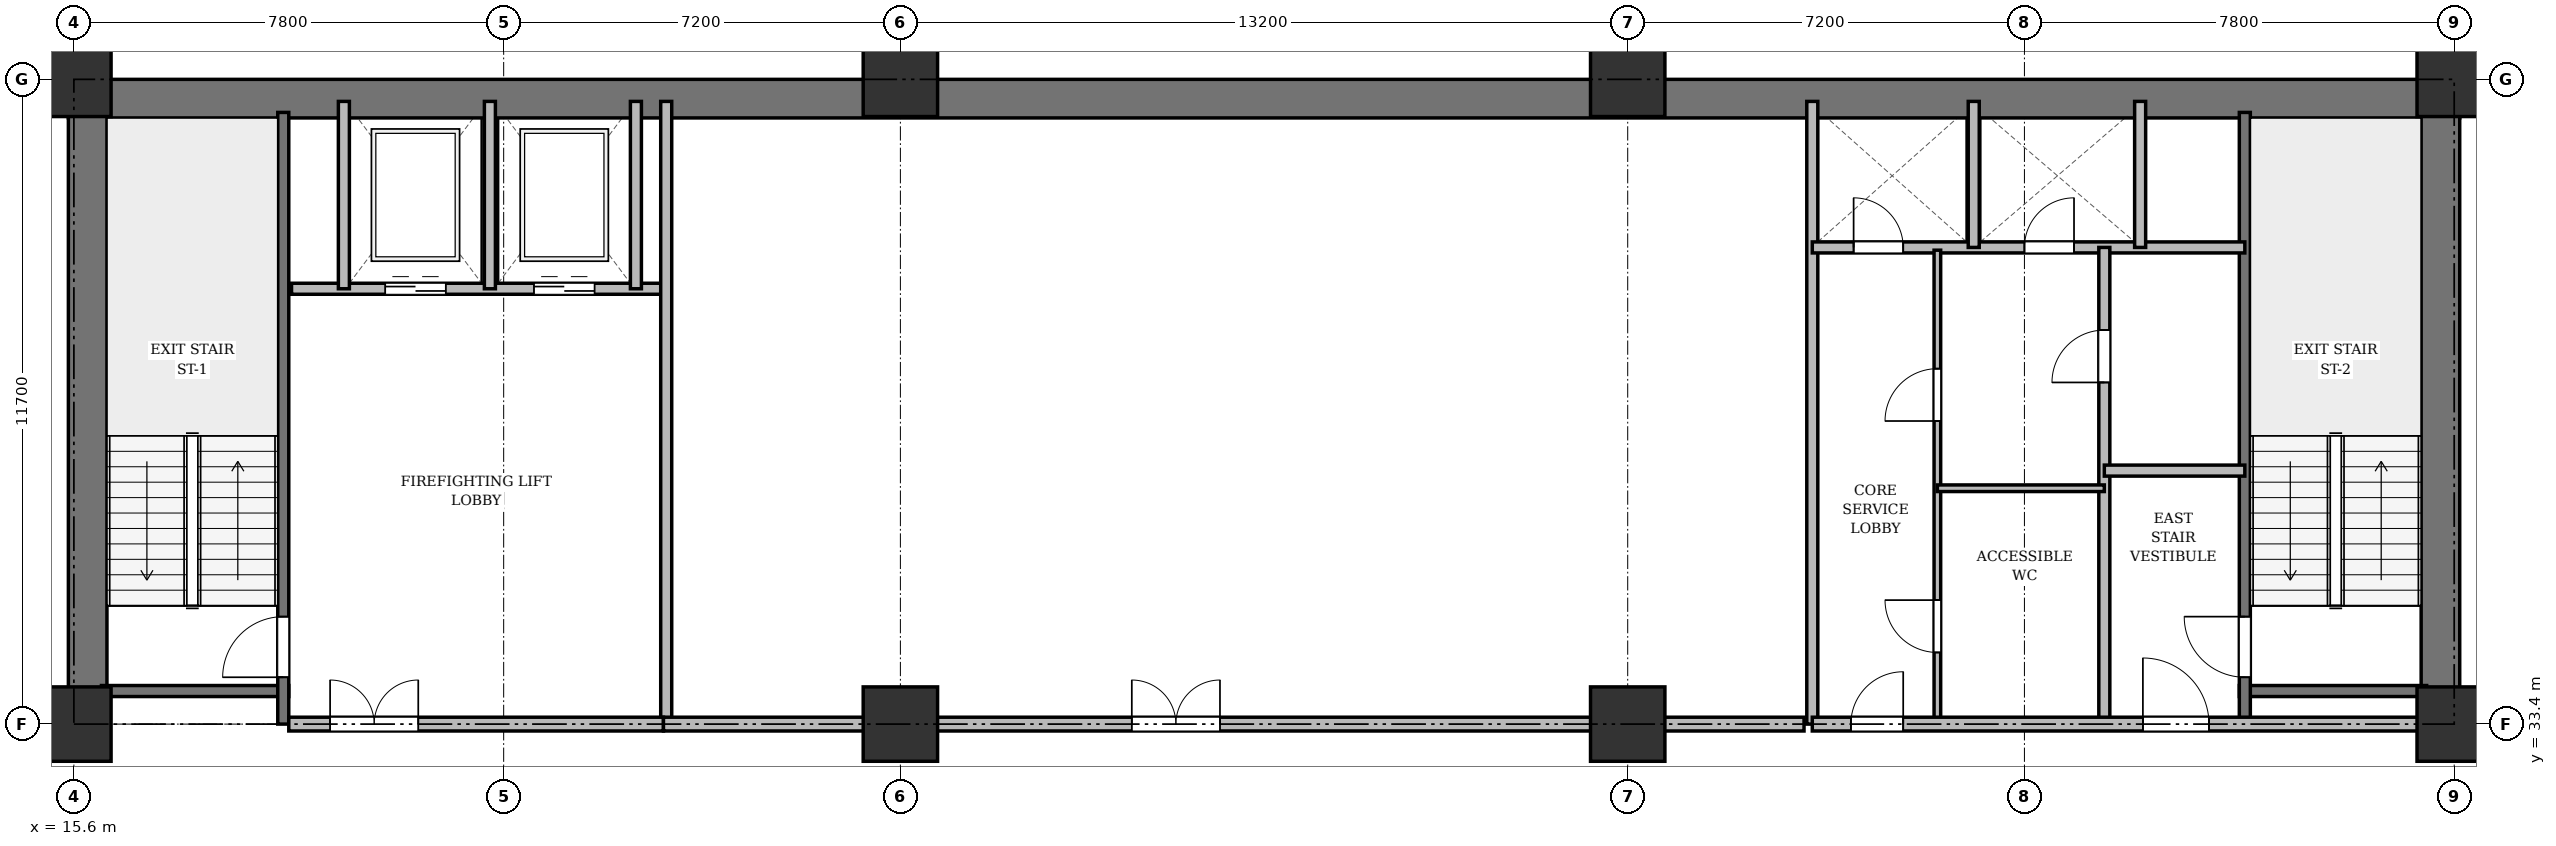
"""IFC4 building model, lengths in metres.
Left out: names, types, materials, properties, quantities, classifications, styles, units other than length and angle.
Written with IfcOpenShell. Run it as: python <this file> out.ifc"""

import sys

from ifc_helpers import new_model, si_unit, direction, frame, frame_2d, origin, origin_2d, place, context, subcontext, project, spatial, rectangle, extrude, source, transform, mapped, element, fill, save


model = new_model("IFC4")
c1 = context("Model", 3, precision=1e-05, world=origin(), true_north=direction((0.0, 1.0)))
c2 = subcontext(c1, "Body", "Model", "MODEL_VIEW")
j1 = project(units=[si_unit("LENGTHUNIT", "METRE"), si_unit("PLANEANGLEUNIT", "RADIAN")], contexts=[c1])
p1 = place(None, origin())
s1 = spatial("IfcSite", under=j1, at=p1, CompositionType="ELEMENT")
p2 = place(p1, origin())
s2 = spatial("IfcBuilding", under=s1, at=p2, CompositionType="ELEMENT")
p3 = place(p2, frame((0.0, 0.0, -8.6)))
s3 = spatial("IfcBuildingStorey", under=s2, at=p3, CompositionType="ELEMENT", Elevation=-8.6)
m1 = source(origin(), c2, "Body", "SweptSolid", [
    extrude(rectangle(XDim=1.35, YDim=1.35, at=origin_2d()), origin(), (0.0, 0.0, 1.0), 4.3),
])
for number, where, z_axis, x_axis in (
    (1, (15.6, 33.4, 0.0), (0.0, 0.0, 1.0), (1.0, 0.0, 0.0)),
    (2, (15.6, 45.1, 0.0), (0.0, 0.0, 1.0), (1.0, 0.0, 0.0)),
    (3, (30.6, 33.4, 0.0), (0.0, 0.0, 1.0), (1.0, 0.0, 0.0)),
    (4, (30.6, 45.1, 0.0), (0.0, 0.0, 1.0), (1.0, 0.0, 0.0)),
    (5, (43.8, 33.4, 0.0), (0.0, 0.0, 1.0), (1.0, 0.0, 0.0)),
    (6, (43.8, 45.1, 0.0), (0.0, 0.0, 1.0), (1.0, 0.0, 0.0)),
    (7, (58.8, 33.4, 0.0), (0.0, 0.0, 1.0), (1.0, 0.0, 0.0)),
    (8, (58.8, 45.1, 0.0), (0.0, 0.0, 1.0), (1.0, 0.0, 0.0)),
):
    element("IfcColumn", number, at=place(p3, frame(where, z_axis=z_axis, x_axis=x_axis)), inside=s3, PredefinedType="COLUMN", context=c2, shape_type="MappedRepresentation", body=[
        mapped(m1, transform((0.0, 0.0, 0.0), x_axis=(1.0, 0.0, 0.0), y_axis=(0.0, 1.0, 0.0), z_axis=(0.0, 0.0, 1.0), scale=1.0)),
    ])
p4 = place(p3, frame((15.5, 44.75, 0.0), z_axis=(0.0, 0.0, 1.0), x_axis=(1.0, 0.0, 0.0)))
e9 = element("IfcWall", 9, at=p4, inside=s3, PredefinedType="SHEAR", context=c2, shape_type="SweptSolid", body=[
    extrude(rectangle(XDim=43.4, YDim=0.7, at=frame_2d((21.7, 0.0))), origin(), (0.0, 0.0, 1.0), 3.98),
])
for number, where, z_axis, x_axis in (
    (10, (15.85, 33.4, 0.0), (0.0, 0.0, 1.0), (0.0, 1.0, 0.0)),
    (11, (58.55, 33.4, 0.0), (0.0, 0.0, 1.0), (0.0, 1.0, 0.0)),
):
    element("IfcWall", number, at=place(p3, frame(where, z_axis=z_axis, x_axis=x_axis)), inside=s3, PredefinedType="SHEAR", context=c2, shape_type="SweptSolid", body=[
        extrude(rectangle(XDim=11.7, YDim=0.7, at=frame_2d((5.85, 0.0))), origin(), (0.0, 0.0, 1.0), 3.98),
    ])
p5 = place(p3, frame((16.1, 34.0, 0.0), z_axis=(0.0, 0.0, 1.0), x_axis=(1.0, 0.0, 0.0)))
e12 = element("IfcWall", 12, at=p5, inside=s3, PredefinedType="SHEAR", context=c2, shape_type="SweptSolid", body=[
    extrude(rectangle(XDim=3.4, YDim=0.2, at=frame_2d((1.7, 0.0))), origin(), (0.0, 0.0, 1.0), 3.98),
])
p6 = place(p3, frame((19.4, 33.4, 0.0), z_axis=(0.0, 0.0, 1.0), x_axis=(0.0, 1.0, 0.0)))
e13 = element("IfcWall", 13, at=p6, inside=s3, PredefinedType="SHEAR", context=c2, shape_type="SweptSolid", body=[
    extrude(rectangle(XDim=11.1, YDim=0.2, at=frame_2d((5.55, 0.0))), origin(), (0.0, 0.0, 1.0), 3.98),
])
p7 = place(p6, frame((0.85, 0.0, 0.0)))
e14 = element("IfcOpeningElement", 14, at=p7, cuts=e13, PredefinedType="OPENING", context=c2, shape_type="SweptSolid", body=[
    extrude(rectangle(XDim=1.1, YDim=2.15, at=frame_2d((0.55, 1.075))), frame((0.0, 0.11, 0.0), z_axis=(0.0, -1.0, 0.0), x_axis=(1.0, 0.0, 0.0)), (0.0, 0.0, 1.0), 0.22),
])
p8 = place(p3, frame((54.9, 34.0, 0.0), z_axis=(0.0, 0.0, 1.0), x_axis=(1.0, 0.0, 0.0)))
e15 = element("IfcWall", 15, at=p8, inside=s3, PredefinedType="SHEAR", context=c2, shape_type="SweptSolid", body=[
    extrude(rectangle(XDim=3.4, YDim=0.2, at=frame_2d((1.7, 0.0))), origin(), (0.0, 0.0, 1.0), 3.98),
])
p9 = place(p3, frame((55.0, 33.4, 0.0), z_axis=(0.0, 0.0, 1.0), x_axis=(0.0, 1.0, 0.0)))
e16 = element("IfcWall", 16, at=p9, inside=s3, PredefinedType="SHEAR", context=c2, shape_type="SweptSolid", body=[
    extrude(rectangle(XDim=11.1, YDim=0.2, at=frame_2d((5.55, 0.0))), origin(), (0.0, 0.0, 1.0), 3.98),
])
p10 = place(p9, frame((0.85, 0.0, 0.0)))
e17 = element("IfcOpeningElement", 17, at=p10, cuts=e16, PredefinedType="OPENING", context=c2, shape_type="SweptSolid", body=[
    extrude(rectangle(XDim=1.1, YDim=2.15, at=frame_2d((0.55, 1.075))), frame((0.0, 0.11, 0.0), z_axis=(0.0, -1.0, 0.0), x_axis=(1.0, 0.0, 0.0)), (0.0, 0.0, 1.0), 0.22),
])
p11 = place(p3, frame((19.55, 41.3, 0.0), z_axis=(0.0, 0.0, 1.0), x_axis=(1.0, 0.0, 0.0)))
e18 = element("IfcWall", 18, at=p11, inside=s3, PredefinedType="SOLIDWALL", context=c2, shape_type="SweptSolid", body=[
    extrude(rectangle(XDim=6.75, YDim=0.2, at=frame_2d((3.375, 0.0))), origin(), (0.0, 0.0, 1.0), 3.98),
])
p12 = place(p11, frame((1.7, 0.0, 0.0)))
e19 = element("IfcOpeningElement", 19, at=p12, cuts=e18, PredefinedType="OPENING", context=c2, shape_type="SweptSolid", body=[
    extrude(rectangle(XDim=1.1, YDim=2.15, at=frame_2d((0.55, 1.075))), frame((0.0, 0.11, 0.0), z_axis=(0.0, -1.0, 0.0), x_axis=(1.0, 0.0, 0.0)), (0.0, 0.0, 1.0), 0.22),
])
p13 = place(p11, frame((4.4, 0.0, 0.0)))
e20 = element("IfcOpeningElement", 20, at=p13, cuts=e18, PredefinedType="OPENING", context=c2, shape_type="SweptSolid", body=[
    extrude(rectangle(XDim=1.1, YDim=2.15, at=frame_2d((0.55, 1.075))), frame((0.0, 0.11, 0.0), z_axis=(0.0, -1.0, 0.0), x_axis=(1.0, 0.0, 0.0)), (0.0, 0.0, 1.0), 0.22),
])
for number, where, z_axis, x_axis in (
    (21, (20.5, 41.3, 0.0), (0.0, 0.0, 1.0), (0.0, 1.0, 0.0)),
    (22, (23.15, 41.3, 0.0), (0.0, 0.0, 1.0), (0.0, 1.0, 0.0)),
    (23, (25.8, 41.3, 0.0), (0.0, 0.0, 1.0), (0.0, 1.0, 0.0)),
):
    element("IfcWall", number, at=place(p3, frame(where, z_axis=z_axis, x_axis=x_axis)), inside=s3, PredefinedType="SOLIDWALL", context=c2, shape_type="SweptSolid", body=[
        extrude(rectangle(XDim=3.4, YDim=0.2, at=frame_2d((1.7, 0.0))), origin(), (0.0, 0.0, 1.0), 3.98),
    ])
p14 = place(p3, frame((26.35, 33.4, 0.0), z_axis=(0.0, 0.0, 1.0), x_axis=(0.0, 1.0, 0.0)))
e24 = element("IfcWall", 24, at=p14, inside=s3, PredefinedType="SOLIDWALL", context=c2, shape_type="SweptSolid", body=[
    extrude(rectangle(XDim=11.3, YDim=0.2, at=frame_2d((5.65, 0.0))), origin(), (0.0, 0.0, 1.0), 3.28),
])
p15 = place(p3, frame((19.5, 33.4, 0.0), z_axis=(0.0, 0.0, 1.0), x_axis=(1.0, 0.0, 0.0)))
e25 = element("IfcWall", 25, at=p15, inside=s3, PredefinedType="PARTITIONING", context=c2, shape_type="SweptSolid", body=[
    extrude(rectangle(XDim=6.8, YDim=0.25, at=frame_2d((3.4, 0.0))), origin(), (0.0, 0.0, 1.0), 3.28),
])
p16 = place(p15, frame((0.75, 0.0, 0.0)))
e26 = element("IfcOpeningElement", 26, at=p16, cuts=e25, PredefinedType="OPENING", context=c2, shape_type="SweptSolid", body=[
    extrude(rectangle(XDim=1.6, YDim=2.2, at=frame_2d((0.8, 1.1))), frame((0.0, 0.135, 0.0), z_axis=(0.0, -1.0, 0.0), x_axis=(1.0, 0.0, 0.0)), (0.0, 0.0, 1.0), 0.27),
])
p17 = place(p3, frame((47.15, 33.4, 0.0), z_axis=(0.0, 0.0, 1.0), x_axis=(0.0, 1.0, 0.0)))
e27 = element("IfcWall", 27, at=p17, inside=s3, PredefinedType="SOLIDWALL", context=c2, shape_type="SweptSolid", body=[
    extrude(rectangle(XDim=11.3, YDim=0.2, at=frame_2d((5.65, 0.0))), origin(), (0.0, 0.0, 1.0), 3.28),
])
p18 = place(p3, frame((26.3, 33.4, 0.0), z_axis=(0.0, 0.0, 1.0), x_axis=(1.0, 0.0, 0.0)))
e28 = element("IfcWall", 28, at=p18, inside=s3, PredefinedType="PARTITIONING", context=c2, shape_type="SweptSolid", body=[
    extrude(rectangle(XDim=20.7, YDim=0.25, at=frame_2d((10.35, 0.0))), origin(), (0.0, 0.0, 1.0), 3.28),
])
p19 = place(p18, frame((8.5, 0.0, 0.0)))
e29 = element("IfcOpeningElement", 29, at=p19, cuts=e28, PredefinedType="OPENING", context=c2, shape_type="SweptSolid", body=[
    extrude(rectangle(XDim=1.6, YDim=2.2, at=frame_2d((0.8, 1.1))), frame((0.0, 0.135, 0.0), z_axis=(0.0, -1.0, 0.0), x_axis=(1.0, 0.0, 0.0)), (0.0, 0.0, 1.0), 0.27),
])
p20 = place(p3, frame((47.15, 42.05, 0.0), z_axis=(0.0, 0.0, 1.0), x_axis=(1.0, 0.0, 0.0)))
e30 = element("IfcWall", 30, at=p20, inside=s3, PredefinedType="SOLIDWALL", context=c2, shape_type="SweptSolid", body=[
    extrude(rectangle(XDim=7.85, YDim=0.2, at=frame_2d((3.925, 0.0))), origin(), (0.0, 0.0, 1.0), 3.98),
])
p21 = place(p20, frame((0.75, 0.0, 0.0)))
e31 = element("IfcOpeningElement", 31, at=p21, cuts=e30, PredefinedType="OPENING", context=c2, shape_type="SweptSolid", body=[
    extrude(rectangle(XDim=0.9, YDim=2.1, at=frame_2d((0.45, 1.05))), frame((0.0, 0.11, 0.0), z_axis=(0.0, -1.0, 0.0), x_axis=(1.0, 0.0, 0.0)), (0.0, 0.0, 1.0), 0.22),
])
p22 = place(p20, frame((3.85, 0.0, 0.0)))
e32 = element("IfcOpeningElement", 32, at=p22, cuts=e30, PredefinedType="OPENING", context=c2, shape_type="SweptSolid", body=[
    extrude(rectangle(XDim=0.9, YDim=2.1, at=frame_2d((0.45, 1.05))), frame((0.0, 0.11, 0.0), z_axis=(0.0, -1.0, 0.0), x_axis=(1.0, 0.0, 0.0)), (0.0, 0.0, 1.0), 0.22),
])
for number, where, z_axis, x_axis in (
    (33, (50.08, 42.05, 0.0), (0.0, 0.0, 1.0), (0.0, 1.0, 0.0)),
    (34, (53.1, 42.05, 0.0), (0.0, 0.0, 1.0), (0.0, 1.0, 0.0)),
):
    element("IfcWall", number, at=place(p3, frame(where, z_axis=z_axis, x_axis=x_axis)), inside=s3, PredefinedType="SOLIDWALL", context=c2, shape_type="SweptSolid", body=[
        extrude(rectangle(XDim=2.65, YDim=0.2, at=frame_2d((1.325, 0.0))), origin(), (0.0, 0.0, 1.0), 3.98),
    ])
p23 = place(p3, frame((52.45, 33.4, 0.0), z_axis=(0.0, 0.0, 1.0), x_axis=(0.0, 1.0, 0.0)))
e35 = element("IfcWall", 35, at=p23, inside=s3, PredefinedType="PARTITIONING", context=c2, shape_type="SweptSolid", body=[
    extrude(rectangle(XDim=8.65, YDim=0.2, at=frame_2d((4.325, 0.0))), origin(), (0.0, 0.0, 1.0), 3.28),
])
p24 = place(p23, frame((6.2, 0.0, 0.0)))
e36 = element("IfcOpeningElement", 36, at=p24, cuts=e35, PredefinedType="OPENING", context=c2, shape_type="SweptSolid", body=[
    extrude(rectangle(XDim=0.95, YDim=2.15, at=frame_2d((0.475, 1.075))), frame((0.0, 0.11, 0.0), z_axis=(0.0, -1.0, 0.0), x_axis=(1.0, 0.0, 0.0)), (0.0, 0.0, 1.0), 0.22),
])
p25 = place(p3, frame((52.45, 38.0, 0.0), z_axis=(0.0, 0.0, 1.0), x_axis=(1.0, 0.0, 0.0)))
e37 = element("IfcWall", 37, at=p25, inside=s3, PredefinedType="PARTITIONING", context=c2, shape_type="SweptSolid", body=[
    extrude(rectangle(XDim=2.55, YDim=0.2, at=frame_2d((1.275, 0.0))), origin(), (0.0, 0.0, 1.0), 3.98),
])
p26 = place(p3, frame((49.42, 33.4, 0.0), z_axis=(0.0, 0.0, 1.0), x_axis=(0.0, 1.0, 0.0)))
e38 = element("IfcWall", 38, at=p26, inside=s3, PredefinedType="PARTITIONING", context=c2, shape_type="SweptSolid", body=[
    extrude(rectangle(XDim=8.6, YDim=0.12, at=frame_2d((4.3, 0.0))), origin(), (0.0, 0.0, 1.0), 3.28),
])
p27 = place(p26, frame((1.3, 0.0, 0.0)))
e39 = element("IfcOpeningElement", 39, at=p27, cuts=e38, PredefinedType="OPENING", context=c2, shape_type="SweptSolid", body=[
    extrude(rectangle(XDim=0.95, YDim=2.15, at=frame_2d((0.475, 1.075))), frame((0.0, 0.07, 0.0), z_axis=(0.0, -1.0, 0.0), x_axis=(1.0, 0.0, 0.0)), (0.0, 0.0, 1.0), 0.14),
])
p28 = place(p26, frame((5.5, 0.0, 0.0)))
e40 = element("IfcOpeningElement", 40, at=p28, cuts=e38, PredefinedType="OPENING", context=c2, shape_type="SweptSolid", body=[
    extrude(rectangle(XDim=0.95, YDim=2.15, at=frame_2d((0.475, 1.075))), frame((0.0, 0.07, 0.0), z_axis=(0.0, -1.0, 0.0), x_axis=(1.0, 0.0, 0.0)), (0.0, 0.0, 1.0), 0.14),
])
p29 = place(p3, frame((49.42, 37.68, 0.0), z_axis=(0.0, 0.0, 1.0), x_axis=(1.0, 0.0, 0.0)))
e41 = element("IfcWall", 41, at=p29, inside=s3, PredefinedType="PARTITIONING", context=c2, shape_type="SweptSolid", body=[
    extrude(rectangle(XDim=3.03, YDim=0.12, at=frame_2d((1.515, 0.0))), origin(), (0.0, 0.0, 1.0), 3.98),
])
p30 = place(p3, frame((47.15, 33.4, 0.0), z_axis=(0.0, 0.0, 1.0), x_axis=(1.0, 0.0, 0.0)))
e42 = element("IfcWall", 42, at=p30, inside=s3, PredefinedType="PARTITIONING", context=c2, shape_type="SweptSolid", body=[
    extrude(rectangle(XDim=11.15, YDim=0.25, at=frame_2d((5.575, 0.0))), origin(), (0.0, 0.0, 1.0), 3.28),
])
p31 = place(p30, frame((0.7, 0.0, 0.0)))
e43 = element("IfcOpeningElement", 43, at=p31, cuts=e42, PredefinedType="OPENING", context=c2, shape_type="SweptSolid", body=[
    extrude(rectangle(XDim=0.95, YDim=2.15, at=frame_2d((0.475, 1.075))), frame((0.0, 0.135, 0.0), z_axis=(0.0, -1.0, 0.0), x_axis=(1.0, 0.0, 0.0)), (0.0, 0.0, 1.0), 0.27),
])
p32 = place(p30, frame((6.0, 0.0, 0.0)))
e44 = element("IfcOpeningElement", 44, at=p32, cuts=e42, PredefinedType="OPENING", context=c2, shape_type="SweptSolid", body=[
    extrude(rectangle(XDim=1.2, YDim=2.15, at=frame_2d((0.6, 1.075))), frame((0.0, 0.135, 0.0), z_axis=(0.0, -1.0, 0.0), x_axis=(1.0, 0.0, 0.0)), (0.0, 0.0, 1.0), 0.27),
])
p33 = place(p3, frame((58.5, 33.4, 0.0), z_axis=(0.0, 0.0, 1.0), x_axis=(1.0, 0.0, 0.0)))
e45 = element("IfcWall", 45, at=p33, inside=s3, PredefinedType="PARTITIONING", context=c2, shape_type="SweptSolid", body=[
    extrude(rectangle(XDim=15.1, YDim=0.2, at=frame_2d((7.55, 0.0))), origin(), (0.0, 0.0, 1.0), 3.28),
])
p34 = place(p33, frame((7.2, 0.0, 0.0)))
e46 = element("IfcOpeningElement", 46, at=p34, cuts=e45, PredefinedType="OPENING", context=c2, shape_type="SweptSolid", body=[
    extrude(rectangle(XDim=1.2, YDim=2.15, at=frame_2d((0.6, 1.075))), frame((0.0, 0.11, 0.0), z_axis=(0.0, -1.0, 0.0), x_axis=(1.0, 0.0, 0.0)), (0.0, 0.0, 1.0), 0.22),
])
m2 = source(origin(), c2, "Body", "SweptSolid", [
    extrude(rectangle(XDim=1.1, YDim=2.15, at=frame_2d((0.55, 1.075))), frame((0.0, 0.025, 0.0), z_axis=(0.0, -1.0, 0.0), x_axis=(1.0, 0.0, 0.0)), (0.0, 0.0, 1.0), 0.05),
])
p35 = place(p7, origin())
e47 = element("IfcDoor", 47, at=p35, inside=s3, OperationType="SINGLE_SWING_LEFT", PredefinedType="DOOR", context=c2, shape_type="MappedRepresentation", body=[
    mapped(m2, transform((0.0, 0.0, 0.0), x_axis=(1.0, 0.0, 0.0), y_axis=(0.0, 1.0, 0.0), z_axis=(0.0, 0.0, 1.0), scale=1.0)),
])
fill(e14, e47)
p36 = place(p10, origin())
e48 = element("IfcDoor", 48, at=p36, inside=s3, OperationType="SINGLE_SWING_RIGHT", PredefinedType="DOOR", context=c2, shape_type="MappedRepresentation", body=[
    mapped(m2, transform((0.0, 0.0, 0.0), x_axis=(1.0, 0.0, 0.0), y_axis=(0.0, 1.0, 0.0), z_axis=(0.0, 0.0, 1.0), scale=1.0)),
])
fill(e17, e48)
p37 = place(p12, origin())
e49 = element("IfcDoor", 49, at=p37, inside=s3, OperationType="DOUBLE_DOOR_SLIDING", PredefinedType="DOOR", context=c2, shape_type="MappedRepresentation", body=[
    mapped(m2, transform((0.0, 0.0, 0.0), x_axis=(1.0, 0.0, 0.0), y_axis=(0.0, 1.0, 0.0), z_axis=(0.0, 0.0, 1.0), scale=1.0)),
])
fill(e19, e49)
p38 = place(p13, origin())
e50 = element("IfcDoor", 50, at=p38, inside=s3, OperationType="DOUBLE_DOOR_SLIDING", PredefinedType="DOOR", context=c2, shape_type="MappedRepresentation", body=[
    mapped(m2, transform((0.0, 0.0, 0.0), x_axis=(1.0, 0.0, 0.0), y_axis=(0.0, 1.0, 0.0), z_axis=(0.0, 0.0, 1.0), scale=1.0)),
])
fill(e20, e50)
m3 = source(origin(), c2, "Body", "SweptSolid", [
    extrude(rectangle(XDim=1.6, YDim=2.2, at=frame_2d((0.8, 1.1))), frame((0.0, 0.025, 0.0), z_axis=(0.0, -1.0, 0.0), x_axis=(1.0, 0.0, 0.0)), (0.0, 0.0, 1.0), 0.05),
])
p39 = place(p16, origin())
e51 = element("IfcDoor", 51, at=p39, inside=s3, OperationType="DOUBLE_DOOR_SINGLE_SWING", PredefinedType="DOOR", context=c2, shape_type="MappedRepresentation", body=[
    mapped(m3, transform((0.0, 0.0, 0.0), x_axis=(1.0, 0.0, 0.0), y_axis=(0.0, 1.0, 0.0), z_axis=(0.0, 0.0, 1.0), scale=1.0)),
])
fill(e26, e51)
p40 = place(p19, origin())
e52 = element("IfcDoor", 52, at=p40, inside=s3, OperationType="DOUBLE_DOOR_SINGLE_SWING", PredefinedType="DOOR", context=c2, shape_type="MappedRepresentation", body=[
    mapped(m3, transform((0.0, 0.0, 0.0), x_axis=(1.0, 0.0, 0.0), y_axis=(0.0, 1.0, 0.0), z_axis=(0.0, 0.0, 1.0), scale=1.0)),
])
fill(e29, e52)
m4 = source(origin(), c2, "Body", "SweptSolid", [
    extrude(rectangle(XDim=0.9, YDim=2.1, at=frame_2d((0.45, 1.05))), frame((0.0, 0.025, 0.0), z_axis=(0.0, -1.0, 0.0), x_axis=(1.0, 0.0, 0.0)), (0.0, 0.0, 1.0), 0.05),
])
p41 = place(p21, origin())
e53 = element("IfcDoor", 53, at=p41, inside=s3, OperationType="SINGLE_SWING_LEFT", PredefinedType="DOOR", context=c2, shape_type="MappedRepresentation", body=[
    mapped(m4, transform((0.0, 0.0, 0.0), x_axis=(1.0, 0.0, 0.0), y_axis=(0.0, 1.0, 0.0), z_axis=(0.0, 0.0, 1.0), scale=1.0)),
])
fill(e31, e53)
p42 = place(p22, origin())
e54 = element("IfcDoor", 54, at=p42, inside=s3, OperationType="SINGLE_SWING_RIGHT", PredefinedType="DOOR", context=c2, shape_type="MappedRepresentation", body=[
    mapped(m4, transform((0.0, 0.0, 0.0), x_axis=(1.0, 0.0, 0.0), y_axis=(0.0, 1.0, 0.0), z_axis=(0.0, 0.0, 1.0), scale=1.0)),
])
fill(e32, e54)
m5 = source(origin(), c2, "Body", "SweptSolid", [
    extrude(rectangle(XDim=0.95, YDim=2.15, at=frame_2d((0.475, 1.075))), frame((0.0, 0.025, 0.0), z_axis=(0.0, -1.0, 0.0), x_axis=(1.0, 0.0, 0.0)), (0.0, 0.0, 1.0), 0.05),
])
p43 = place(p24, origin())
e55 = element("IfcDoor", 55, at=p43, inside=s3, OperationType="SINGLE_SWING_LEFT", PredefinedType="DOOR", context=c2, shape_type="MappedRepresentation", body=[
    mapped(m5, transform((0.0, 0.0, 0.0), x_axis=(1.0, 0.0, 0.0), y_axis=(0.0, 1.0, 0.0), z_axis=(0.0, 0.0, 1.0), scale=1.0)),
])
fill(e36, e55)
p44 = place(p27, origin())
e56 = element("IfcDoor", 56, at=p44, inside=s3, OperationType="SINGLE_SWING_RIGHT", PredefinedType="DOOR", context=c2, shape_type="MappedRepresentation", body=[
    mapped(m5, transform((0.0, 0.0, 0.0), x_axis=(1.0, 0.0, 0.0), y_axis=(0.0, 1.0, 0.0), z_axis=(0.0, 0.0, 1.0), scale=1.0)),
])
fill(e39, e56)
p45 = place(p28, origin())
e57 = element("IfcDoor", 57, at=p45, inside=s3, OperationType="SINGLE_SWING_LEFT", PredefinedType="DOOR", context=c2, shape_type="MappedRepresentation", body=[
    mapped(m5, transform((0.0, 0.0, 0.0), x_axis=(1.0, 0.0, 0.0), y_axis=(0.0, 1.0, 0.0), z_axis=(0.0, 0.0, 1.0), scale=1.0)),
])
fill(e40, e57)
p46 = place(p31, origin())
e58 = element("IfcDoor", 58, at=p46, inside=s3, OperationType="SINGLE_SWING_RIGHT", PredefinedType="DOOR", context=c2, shape_type="MappedRepresentation", body=[
    mapped(m5, transform((0.0, 0.0, 0.0), x_axis=(1.0, 0.0, 0.0), y_axis=(0.0, 1.0, 0.0), z_axis=(0.0, 0.0, 1.0), scale=1.0)),
])
fill(e43, e58)
m6 = source(origin(), c2, "Body", "SweptSolid", [
    extrude(rectangle(XDim=1.2, YDim=2.15, at=frame_2d((0.6, 1.075))), frame((0.0, 0.025, 0.0), z_axis=(0.0, -1.0, 0.0), x_axis=(1.0, 0.0, 0.0)), (0.0, 0.0, 1.0), 0.05),
])
p47 = place(p32, origin())
e59 = element("IfcDoor", 59, at=p47, inside=s3, OperationType="SINGLE_SWING_LEFT", PredefinedType="DOOR", context=c2, shape_type="MappedRepresentation", body=[
    mapped(m6, transform((0.0, 0.0, 0.0), x_axis=(1.0, 0.0, 0.0), y_axis=(0.0, 1.0, 0.0), z_axis=(0.0, 0.0, 1.0), scale=1.0)),
])
fill(e44, e59)
save(model, sys.argv[1])
